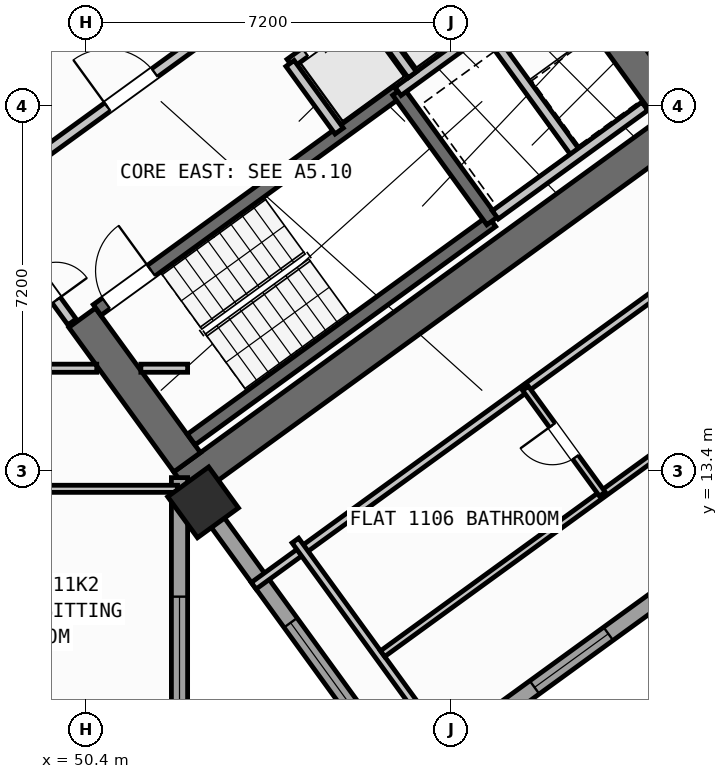
"""IFC4 building model, lengths in metres.
Left out: names, types, materials, properties, quantities, classifications, styles, units other than length and angle.
Written with IfcOpenShell. Run it as: python <this file> out.ifc"""

import sys

from ifc_helpers import new_model, si_unit, direction, frame, frame_2d, origin, origin_2d, place, context, subcontext, project, spatial, rectangle, hollow_rectangle, extrude, source, transform, mapped, element, fill, save


model = new_model("IFC4")
c1 = context("Model", 3, precision=1e-05, world=origin(), true_north=direction((0.0, 1.0)))
c2 = subcontext(c1, "Body", "Model", "MODEL_VIEW")
j1 = project(units=[si_unit("LENGTHUNIT", "METRE"), si_unit("PLANEANGLEUNIT", "RADIAN")], contexts=[c1])
p1 = place(None, origin())
s1 = spatial("IfcSite", under=j1, at=p1, CompositionType="ELEMENT")
p2 = place(p1, origin())
s2 = spatial("IfcBuilding", under=s1, at=p2, CompositionType="ELEMENT")
p3 = place(p2, frame((0.0, 0.0, 45.6)))
s3 = spatial("IfcBuildingStorey", under=s2, at=p3, CompositionType="ELEMENT", Elevation=45.6)
p4 = place(p3, frame((52.318, 13.11, 0.0), z_axis=(0.0, 0.0, 1.0), x_axis=(0.809019445368, 0.587781878776, 0.0)))
e1 = element("IfcWall", 1, at=p4, inside=s3, PredefinedType="SHEAR", context=c2, shape_type="SweptSolid", body=[
    extrude(rectangle(XDim=12.44, YDim=0.65, at=frame_2d((6.22, 0.0))), origin(), (0.0, 0.0, 1.0), 3.35),
])
p5 = place(p3, frame((52.39, 13.564, 0.0), z_axis=(0.0, 0.0, 1.0), x_axis=(-0.58779688989, 0.809008539037, 0.0)))
e2 = element("IfcWall", 2, at=p5, inside=s3, PredefinedType="SHEAR", context=c2, shape_type="SweptSolid", body=[
    extrude(rectangle(XDim=3.525, YDim=0.65, at=frame_2d((1.763, 0.0))), origin(), (0.0, 0.0, 1.0), 3.35),
])
p6 = place(p3, frame((61.929, 20.494, 0.0), z_axis=(0.0, 0.0, 1.0), x_axis=(-0.58782982593, 0.808984607855, 0.0)))
e3 = element("IfcWall", 3, at=p6, inside=s3, PredefinedType="SHEAR", context=c2, shape_type="SweptSolid", body=[
    extrude(rectangle(XDim=3.525, YDim=0.65, at=frame_2d((1.762, 0.0))), origin(), (0.0, 0.0, 1.0), 3.35),
])
m1 = source(origin(), c2, "Body", "SweptSolid", [
    extrude(hollow_rectangle(XDim=1.0, YDim=1.0, WallThickness=0.04, at=origin_2d()), origin(), (0.0, 0.0, 1.0), 3.6),
])
p7 = place(p3, frame((52.705, 12.773, 0.0), z_axis=(0.0, 0.0, 1.0), x_axis=(0.809016994375, 0.587785252292, 0.0)))
e4 = element("IfcColumn", 4, at=p7, inside=s3, PredefinedType="COLUMN", context=c2, shape_type="MappedRepresentation", body=[
    mapped(m1, transform((0.0, 0.0, 0.0), scale=1.0)),
])
p8 = place(p3, frame((58.455, 35.484, 0.0), z_axis=(0.0, 0.0, 1.0), x_axis=(0.587783625747, -0.809018176127, 0.0)))
e5 = element("IfcWall", 5, at=p8, inside=s3, PredefinedType="STANDARD", context=c2, shape_type="SweptSolid", body=[
    extrude(rectangle(XDim=21.587, YDim=0.32, at=frame_2d((10.794, 0.0))), origin(), (0.0, 0.0, 1.0), 2.725),
])
p9 = place(p8, frame((1.5, 0.0, 0.8)))
e6 = element("IfcOpeningElement", 6, at=p9, cuts=e5, PredefinedType="OPENING", context=c2, shape_type="SweptSolid", body=[
    extrude(rectangle(XDim=2.1, YDim=1.55, at=frame_2d((1.05, 0.775))), frame((0.0, 0.17, 0.0), z_axis=(0.0, -1.0, 0.0), x_axis=(1.0, 0.0, 0.0)), (0.0, 0.0, 1.0), 0.34),
])
p10 = place(p8, frame((5.105, 0.0, 0.85)))
e7 = element("IfcOpeningElement", 7, at=p10, cuts=e5, PredefinedType="OPENING", context=c2, shape_type="SweptSolid", body=[
    extrude(rectangle(XDim=1.5, YDim=1.5, at=frame_2d((0.75, 0.75))), frame((0.0, 0.17, 0.0), z_axis=(0.0, -1.0, 0.0), x_axis=(1.0, 0.0, 0.0)), (0.0, 0.0, 1.0), 0.34),
])
p11 = place(p8, frame((8.954, 0.0, 0.85)))
e8 = element("IfcOpeningElement", 8, at=p11, cuts=e5, PredefinedType="OPENING", context=c2, shape_type="SweptSolid", body=[
    extrude(rectangle(XDim=1.5, YDim=1.5, at=frame_2d((0.75, 0.75))), frame((0.0, 0.17, 0.0), z_axis=(0.0, -1.0, 0.0), x_axis=(1.0, 0.0, 0.0)), (0.0, 0.0, 1.0), 0.34),
])
p12 = place(p8, frame((17.581, 0.0, 0.95)))
e9 = element("IfcOpeningElement", 9, at=p12, cuts=e5, PredefinedType="OPENING", context=c2, shape_type="SweptSolid", body=[
    extrude(rectangle(XDim=1.2, YDim=1.4, at=frame_2d((0.6, 0.7))), frame((0.0, 0.17, 0.0), z_axis=(0.0, -1.0, 0.0), x_axis=(1.0, 0.0, 0.0)), (0.0, 0.0, 1.0), 0.34),
])
p13 = place(p3, frame((71.098, 17.731, 0.0), z_axis=(0.0, 0.0, 1.0), x_axis=(-0.809021120468, -0.587779573171, 0.0)))
e10 = element("IfcWall", 10, at=p13, inside=s3, PredefinedType="STANDARD", context=c2, shape_type="SweptSolid", body=[
    extrude(rectangle(XDim=17.588, YDim=0.32, at=frame_2d((8.794, 0.0))), origin(), (0.0, 0.0, 1.0), 3.35),
])
p14 = place(p13, frame((1.624, 0.0, 0.0)))
e11 = element("IfcOpeningElement", 11, at=p14, cuts=e10, PredefinedType="OPENING", context=c2, shape_type="SweptSolid", body=[
    extrude(rectangle(XDim=1.05, YDim=2.15, at=frame_2d((0.525, 1.075))), frame((0.0, 0.17, 0.0), z_axis=(0.0, -1.0, 0.0), x_axis=(1.0, 0.0, 0.0)), (0.0, 0.0, 1.0), 0.34),
])
p15 = place(p13, frame((4.104, 0.0, 1.0)))
e12 = element("IfcOpeningElement", 12, at=p15, cuts=e10, PredefinedType="OPENING", context=c2, shape_type="SweptSolid", body=[
    extrude(rectangle(XDim=0.9, YDim=1.25, at=frame_2d((0.45, 0.625))), frame((0.0, 0.17, 0.0), z_axis=(0.0, -1.0, 0.0), x_axis=(1.0, 0.0, 0.0)), (0.0, 0.0, 1.0), 0.34),
])
p16 = place(p13, frame((7.879, 0.0, 0.85)))
e13 = element("IfcOpeningElement", 13, at=p16, cuts=e10, PredefinedType="OPENING", context=c2, shape_type="SweptSolid", body=[
    extrude(rectangle(XDim=1.8, YDim=1.5, at=frame_2d((0.9, 0.75))), frame((0.0, 0.17, 0.0), z_axis=(0.0, -1.0, 0.0), x_axis=(1.0, 0.0, 0.0)), (0.0, 0.0, 1.0), 0.34),
])
p17 = place(p13, frame((12.849, 0.0, 0.85)))
e14 = element("IfcOpeningElement", 14, at=p17, cuts=e10, PredefinedType="OPENING", context=c2, shape_type="SweptSolid", body=[
    extrude(rectangle(XDim=1.8, YDim=1.5, at=frame_2d((0.9, 0.75))), frame((0.0, 0.17, 0.0), z_axis=(0.0, -1.0, 0.0), x_axis=(1.0, 0.0, 0.0)), (0.0, 0.0, 1.0), 0.34),
])
p18 = place(p3, frame((56.581, 7.439, 0.0), z_axis=(0.0, 0.0, 1.0), x_axis=(-0.587785875463, 0.809016541614, 0.0)))
e15 = element("IfcWall", 15, at=p18, inside=s3, PredefinedType="STANDARD", context=c2, shape_type="SweptSolid", body=[
    extrude(rectangle(XDim=6.774, YDim=0.32, at=frame_2d((3.387, 0.0))), origin(), (0.0, 0.0, 1.0), 2.725),
])
p19 = place(p18, frame((1.556, 0.0, 0.8)))
e16 = element("IfcOpeningElement", 16, at=p19, cuts=e15, PredefinedType="OPENING", context=c2, shape_type="SweptSolid", body=[
    extrude(rectangle(XDim=2.1, YDim=1.55, at=frame_2d((1.05, 0.775))), frame((0.0, 0.17, 0.0), z_axis=(0.0, -1.0, 0.0), x_axis=(1.0, 0.0, 0.0)), (0.0, 0.0, 1.0), 0.34),
])
p20 = place(p3, frame((52.24, 13.261, 0.0), z_axis=(0.0, 0.0, 1.0), x_axis=(0.0, -1.0, 0.0)))
e17 = element("IfcWall", 17, at=p20, inside=s3, PredefinedType="STANDARD", context=c2, shape_type="SweptSolid", body=[
    extrude(rectangle(XDim=9.795, YDim=0.32, at=frame_2d((4.897, 0.0))), origin(), (0.0, 0.0, 1.0), 3.35),
])
p21 = place(p20, frame((2.349, 0.0, 0.8)))
e18 = element("IfcOpeningElement", 18, at=p21, cuts=e17, PredefinedType="OPENING", context=c2, shape_type="SweptSolid", body=[
    extrude(rectangle(XDim=2.1, YDim=1.55, at=frame_2d((1.05, 0.775))), frame((0.0, 0.17, 0.0), z_axis=(0.0, -1.0, 0.0), x_axis=(1.0, 0.0, 0.0)), (0.0, 0.0, 1.0), 0.34),
])
p22 = place(p20, frame((7.03, 0.0, 0.85)))
e19 = element("IfcOpeningElement", 19, at=p22, cuts=e17, PredefinedType="OPENING", context=c2, shape_type="SweptSolid", body=[
    extrude(rectangle(XDim=1.8, YDim=1.5, at=frame_2d((0.9, 0.75))), frame((0.0, 0.17, 0.0), z_axis=(0.0, -1.0, 0.0), x_axis=(1.0, 0.0, 0.0)), (0.0, 0.0, 1.0), 0.34),
])
p23 = place(p3, frame((52.472, 14.013, 0.0), z_axis=(0.0, 0.0, 1.0), x_axis=(0.809028366311, 0.587769599847, 0.0)))
e20 = element("IfcWall", 20, at=p23, inside=s3, PredefinedType="SHEAR", context=c2, shape_type="SweptSolid", body=[
    extrude(rectangle(XDim=7.33, YDim=0.26, at=frame_2d((3.665, 0.0))), origin(), (0.0, 0.0, 1.0), 3.35),
])
p24 = place(p3, frame((50.615, 16.57, 0.0), z_axis=(0.0, 0.0, 1.0), x_axis=(0.809028366311, 0.587769599847, 0.0)))
e21 = element("IfcWall", 21, at=p24, inside=s3, PredefinedType="SHEAR", context=c2, shape_type="SweptSolid", body=[
    extrude(rectangle(XDim=7.33, YDim=0.26, at=frame_2d((3.665, 0.0))), origin(), (0.0, 0.0, 1.0), 3.35),
])
p25 = place(p24, frame((0.22, 0.0, 0.0)))
e22 = element("IfcOpeningElement", 22, at=p25, cuts=e21, PredefinedType="OPENING", context=c2, shape_type="SweptSolid", body=[
    extrude(rectangle(XDim=1.1, YDim=2.1, at=frame_2d((0.55, 1.05))), frame((0.0, 0.14, 0.0), z_axis=(0.0, -1.0, 0.0), x_axis=(1.0, 0.0, 0.0)), (0.0, 0.0, 1.0), 0.28),
])
p26 = place(p3, frame((58.41, 18.327, 0.0), z_axis=(0.0, 0.0, 1.0), x_axis=(-0.58776738483, 0.809029975545, 0.0)))
e23 = element("IfcWall", 23, at=p26, inside=s3, PredefinedType="SHEAR", context=c2, shape_type="SweptSolid", body=[
    extrude(rectangle(XDim=3.16, YDim=0.26, at=frame_2d((1.58, 0.0))), origin(), (0.0, 0.0, 1.0), 3.35),
])
p27 = place(p3, frame((47.106, 21.437, 0.0), z_axis=(0.0, 0.0, 1.0), x_axis=(0.809012514015, 0.58779141893, 0.0)))
e24 = element("IfcWall", 24, at=p27, inside=s3, PredefinedType="STANDARD", context=c2, shape_type="SweptSolid", body=[
    extrude(rectangle(XDim=3.398, YDim=0.2, at=frame_2d((1.699, 0.0))), origin(), (0.0, 0.0, 1.0), 3.34),
])
p28 = place(p27, frame((0.408, 0.0, 0.0)))
e25 = element("IfcOpeningElement", 25, at=p28, cuts=e24, PredefinedType="OPENING", context=c2, shape_type="SweptSolid", body=[
    extrude(rectangle(XDim=1.3, YDim=2.2, at=frame_2d((0.65, 1.1))), frame((0.0, 0.11, 0.0), z_axis=(0.0, -1.0, 0.0), x_axis=(1.0, 0.0, 0.0)), (0.0, 0.0, 1.0), 0.22),
])
p29 = place(p3, frame((48.799, 19.107, 0.0), z_axis=(0.0, 0.0, 1.0), x_axis=(0.809012959416, 0.587790805897, 0.0)))
e26 = element("IfcWall", 26, at=p29, inside=s3, PredefinedType="STANDARD", context=c2, shape_type="SweptSolid", body=[
    extrude(rectangle(XDim=5.718, YDim=0.2, at=frame_2d((2.859, 0.0))), origin(), (0.0, 0.0, 1.0), 3.34),
])
p30 = place(p29, frame((2.498, 0.0, 0.0)))
e27 = element("IfcOpeningElement", 27, at=p30, cuts=e26, PredefinedType="OPENING", context=c2, shape_type="SweptSolid", body=[
    extrude(rectangle(XDim=1.15, YDim=2.1, at=frame_2d((0.575, 1.05))), frame((0.0, 0.11, 0.0), z_axis=(0.0, -1.0, 0.0), x_axis=(1.0, 0.0, 0.0)), (0.0, 0.0, 1.0), 0.22),
])
p31 = place(p3, frame((56.553, 20.884, 0.0), z_axis=(0.0, 0.0, 1.0), x_axis=(0.809035789462, 0.587759382205, 0.0)))
e28 = element("IfcWall", 28, at=p31, inside=s3, PredefinedType="STANDARD", context=c2, shape_type="SweptSolid", body=[
    extrude(rectangle(XDim=3.768, YDim=0.2, at=frame_2d((1.884, 0.0))), origin(), (0.0, 0.0, 1.0), 3.34),
])
p32 = place(p31, frame((2.65, 0.0, 0.0)))
e29 = element("IfcOpeningElement", 29, at=p32, cuts=e28, PredefinedType="OPENING", context=c2, shape_type="SweptSolid", body=[
    extrude(rectangle(XDim=0.86, YDim=2.05, at=frame_2d((0.43, 1.025))), frame((0.0, 0.11, 0.0), z_axis=(0.0, -1.0, 0.0), x_axis=(1.0, 0.0, 0.0)), (0.0, 0.0, 1.0), 0.22),
])
p33 = place(p3, frame((54.421, 21.436, 0.0), z_axis=(0.0, 0.0, 1.0), x_axis=(0.809013710463, 0.587789772183, 0.0)))
e30 = element("IfcWall", 30, at=p33, inside=s3, PredefinedType="STANDARD", context=c2, shape_type="SweptSolid", body=[
    extrude(rectangle(XDim=5.36, YDim=0.2, at=frame_2d((2.68, 0.0))), origin(), (0.0, 0.0, 1.0), 3.34),
])
p34 = place(p33, frame((0.37, 0.0, 0.0)))
e31 = element("IfcOpeningElement", 31, at=p34, cuts=e30, PredefinedType="OPENING", context=c2, shape_type="SweptSolid", body=[
    extrude(rectangle(XDim=1.1, YDim=2.15, at=frame_2d((0.55, 1.075))), frame((0.0, 0.11, 0.0), z_axis=(0.0, -1.0, 0.0), x_axis=(1.0, 0.0, 0.0)), (0.0, 0.0, 1.0), 0.22),
])
p35 = place(p33, frame((2.17, 0.0, 0.0)))
e32 = element("IfcOpeningElement", 32, at=p35, cuts=e30, PredefinedType="OPENING", context=c2, shape_type="SweptSolid", body=[
    extrude(rectangle(XDim=1.1, YDim=2.15, at=frame_2d((0.55, 1.075))), frame((0.0, 0.11, 0.0), z_axis=(0.0, -1.0, 0.0), x_axis=(1.0, 0.0, 0.0)), (0.0, 0.0, 1.0), 0.22),
])
p36 = place(p33, frame((3.97, 0.0, 0.0)))
e33 = element("IfcOpeningElement", 33, at=p36, cuts=e30, PredefinedType="OPENING", context=c2, shape_type="SweptSolid", body=[
    extrude(rectangle(XDim=1.1, YDim=2.15, at=frame_2d((0.55, 1.075))), frame((0.0, 0.11, 0.0), z_axis=(0.0, -1.0, 0.0), x_axis=(1.0, 0.0, 0.0)), (0.0, 0.0, 1.0), 0.22),
])
p37 = place(p3, frame((55.391, 20.102, 0.0), z_axis=(0.0, 0.0, 1.0), x_axis=(-0.58778447739, 0.809017557374, 0.0)))
e34 = element("IfcWall", 34, at=p37, inside=s3, PredefinedType="STANDARD", context=c2, shape_type="SweptSolid", body=[
    extrude(rectangle(XDim=1.65, YDim=0.2, at=frame_2d((0.825, 0.0))), origin(), (0.0, 0.0, 1.0), 3.34),
])
p38 = place(p3, frame((56.834, 21.212, 0.0), z_axis=(0.0, 0.0, 1.0), x_axis=(-0.58776738483, 0.809029975545, 0.0)))
e35 = element("IfcWall", 35, at=p38, inside=s3, PredefinedType="STANDARD", context=c2, shape_type="SweptSolid", body=[
    extrude(rectangle(XDim=1.58, YDim=0.2, at=frame_2d((0.79, 0.0))), origin(), (0.0, 0.0, 1.0), 3.34),
])
p39 = place(p3, frame((60.067, 19.655, 0.0), z_axis=(0.0, 0.0, 1.0), x_axis=(-0.587800520745, 0.809005900975, 0.0)))
e36 = element("IfcWall", 36, at=p39, inside=s3, PredefinedType="STANDARD", context=c2, shape_type="SweptSolid", body=[
    extrude(rectangle(XDim=2.66, YDim=0.2, at=frame_2d((1.33, 0.0))), origin(), (0.0, 0.0, 1.0), 3.34),
])
p40 = place(p3, frame((58.472, 18.447, 0.0), z_axis=(0.0, 0.0, 1.0), x_axis=(0.809022487728, 0.587777691266, 0.0)))
e37 = element("IfcWall", 37, at=p40, inside=s3, PredefinedType="STANDARD", context=c2, shape_type="SweptSolid", body=[
    extrude(rectangle(XDim=3.648, YDim=0.2, at=frame_2d((1.824, 0.0))), origin(), (0.0, 0.0, 1.0), 3.34),
])
p41 = place(p3, frame((35.296, 15.42, 0.0), z_axis=(0.0, 0.0, 1.0), x_axis=(1.0, 0.0, 0.0)))
e38 = element("IfcWall", 38, at=p41, inside=s3, PredefinedType="PARTITIONING", context=c2, shape_type="SweptSolid", body=[
    extrude(rectangle(XDim=15.311, YDim=0.16, at=frame_2d((7.655, 0.0))), origin(), (0.0, 0.0, 1.0), 3.34),
])
p42 = place(p41, frame((0.615, 0.0, 0.0)))
e39 = element("IfcOpeningElement", 39, at=p42, cuts=e38, PredefinedType="OPENING", context=c2, shape_type="SweptSolid", body=[
    extrude(rectangle(XDim=1.0, YDim=2.1, at=frame_2d((0.5, 1.05))), frame((0.0, 0.09, 0.0), z_axis=(0.0, -1.0, 0.0), x_axis=(1.0, 0.0, 0.0)), (0.0, 0.0, 1.0), 0.18),
])
p43 = place(p41, frame((9.035, 0.0, 0.0)))
e40 = element("IfcOpeningElement", 40, at=p43, cuts=e38, PredefinedType="OPENING", context=c2, shape_type="SweptSolid", body=[
    extrude(rectangle(XDim=1.0, YDim=2.1, at=frame_2d((0.5, 1.05))), frame((0.0, 0.09, 0.0), z_axis=(0.0, -1.0, 0.0), x_axis=(1.0, 0.0, 0.0)), (0.0, 0.0, 1.0), 0.18),
])
p44 = place(p3, frame((51.477, 15.42, 0.0), z_axis=(0.0, 0.0, 1.0), x_axis=(1.0, 0.0, 0.0)))
e41 = element("IfcWall", 41, at=p44, inside=s3, PredefinedType="PARTITIONING", context=c2, shape_type="SweptSolid", body=[
    extrude(rectangle(XDim=0.923, YDim=0.16, at=frame_2d((0.461, 0.0))), origin(), (0.0, 0.0, 1.0), 3.34),
])
p45 = place(p3, frame((50.119, 16.333, 0.0), z_axis=(0.0, 0.0, 1.0), x_axis=(-0.587749856981, 0.809042709391, 0.0)))
e42 = element("IfcWall", 42, at=p45, inside=s3, PredefinedType="STANDARD", context=c2, shape_type="SweptSolid", body=[
    extrude(rectangle(XDim=2.96, YDim=0.2, at=frame_2d((1.48, 0.0))), origin(), (0.0, 0.0, 1.0), 3.34),
])
p46 = place(p45, frame((0.53, 0.0, 0.0)))
e43 = element("IfcOpeningElement", 43, at=p46, cuts=e42, PredefinedType="OPENING", context=c2, shape_type="SweptSolid", body=[
    extrude(rectangle(XDim=1.5, YDim=2.15, at=frame_2d((0.75, 1.075))), frame((0.0, 0.11, 0.0), z_axis=(0.0, -1.0, 0.0), x_axis=(1.0, 0.0, 0.0)), (0.0, 0.0, 1.0), 0.22),
])
p47 = place(p3, frame((47.663, 13.04, 0.0), z_axis=(0.0, 0.0, 1.0), x_axis=(1.0, 0.0, 0.0)))
e44 = element("IfcWall", 44, at=p47, inside=s3, PredefinedType="PLUMBINGWALL", context=c2, shape_type="SweptSolid", body=[
    extrude(rectangle(XDim=4.538, YDim=0.14, at=frame_2d((2.269, 0.0))), origin(), (0.0, 0.0, 1.0), 2.525),
])
p48 = place(p3, frame((53.705, 11.126, 0.0), z_axis=(0.0, 0.0, 1.0), x_axis=(0.809014504436, 0.587788679384, 0.0)))
e45 = element("IfcWall", 45, at=p48, inside=s3, PredefinedType="PARTITIONING", context=c2, shape_type="SweptSolid", body=[
    extrude(rectangle(XDim=14.67, YDim=0.16, at=frame_2d((7.335, 0.0))), origin(), (0.0, 0.0, 1.0), 3.34),
])
p49 = place(p48, frame((10.2, 0.0, 0.0)))
e46 = element("IfcOpeningElement", 46, at=p49, cuts=e45, PredefinedType="OPENING", context=c2, shape_type="SweptSolid", body=[
    extrude(rectangle(XDim=1.0, YDim=2.1, at=frame_2d((0.5, 1.05))), frame((0.0, 0.09, 0.0), z_axis=(0.0, -1.0, 0.0), x_axis=(1.0, 0.0, 0.0)), (0.0, 0.0, 1.0), 0.18),
])
p50 = place(p3, frame((57.747, 7.586, 0.0), z_axis=(0.0, 0.0, 1.0), x_axis=(-0.587784893399, 0.809017255126, 0.0)))
e47 = element("IfcWall", 47, at=p50, inside=s3, PredefinedType="PARTITIONING", context=c2, shape_type="SweptSolid", body=[
    extrude(rectangle(XDim=5.48, YDim=0.16, at=frame_2d((2.74, 0.0))), origin(), (0.0, 0.0, 1.0), 3.34),
])
p51 = place(p3, frame((56.249, 9.785, 0.0), z_axis=(0.0, 0.0, 1.0), x_axis=(0.809011747655, 0.587792473715, 0.0)))
e48 = element("IfcWall", 48, at=p51, inside=s3, PredefinedType="PLUMBINGWALL", context=c2, shape_type="SweptSolid", body=[
    extrude(rectangle(XDim=13.4, YDim=0.14, at=frame_2d((6.7, 0.0))), origin(), (0.0, 0.0, 1.0), 3.34),
])
p52 = place(p51, frame((8.94, 0.0, 0.0)))
e49 = element("IfcOpeningElement", 49, at=p52, cuts=e48, PredefinedType="OPENING", context=c2, shape_type="SweptSolid", body=[
    extrude(rectangle(XDim=0.92, YDim=2.08, at=frame_2d((0.46, 1.04))), frame((0.0, 0.08, 0.0), z_axis=(0.0, -1.0, 0.0), x_axis=(1.0, 0.0, 0.0)), (0.0, 0.0, 1.0), 0.16),
])
p53 = place(p3, frame((60.585, 12.936, 0.0), z_axis=(0.0, 0.0, 1.0), x_axis=(-0.587772116736, 0.809026537752, 0.0)))
e50 = element("IfcWall", 50, at=p53, inside=s3, PredefinedType="PLUMBINGWALL", context=c2, shape_type="SweptSolid", body=[
    extrude(rectangle(XDim=2.58, YDim=0.14, at=frame_2d((1.29, 0.0))), origin(), (0.0, 0.0, 1.0), 3.34),
])
p54 = place(p53, frame((0.9, 0.0, 0.0)))
e51 = element("IfcOpeningElement", 51, at=p54, cuts=e50, PredefinedType="OPENING", context=c2, shape_type="SweptSolid", body=[
    extrude(rectangle(XDim=0.78, YDim=2.05, at=frame_2d((0.39, 1.025))), frame((0.0, 0.08, 0.0), z_axis=(0.0, -1.0, 0.0), x_axis=(1.0, 0.0, 0.0)), (0.0, 0.0, 1.0), 0.16),
])
m2 = source(origin(), c2, "Body", "SweptSolid", [
    extrude(rectangle(XDim=1.8, YDim=1.5, at=frame_2d((0.9, 0.75))), frame((0.0, 0.03, 0.0), z_axis=(0.0, -1.0, 0.0), x_axis=(1.0, 0.0, 0.0)), (0.0, 0.0, 1.0), 0.06),
])
p55 = place(p17, origin())
e52 = element("IfcWindow", 52, at=p55, inside=s3, PartitioningType="SINGLE_PANEL", PredefinedType="WINDOW", context=c2, shape_type="MappedRepresentation", body=[
    mapped(m2, transform((0.0, 0.0, 0.0), scale=1.0)),
])
fill(e14, e52)
m3 = source(origin(), c2, "Body", "SweptSolid", [
    extrude(rectangle(XDim=2.1, YDim=1.55, at=frame_2d((1.05, 0.775))), frame((0.0, 0.03, 0.0), z_axis=(0.0, -1.0, 0.0), x_axis=(1.0, 0.0, 0.0)), (0.0, 0.0, 1.0), 0.06),
])
p56 = place(p19, origin())
e53 = element("IfcWindow", 53, at=p56, inside=s3, PartitioningType="SINGLE_PANEL", PredefinedType="WINDOW", context=c2, shape_type="MappedRepresentation", body=[
    mapped(m3, transform((0.0, 0.0, 0.0), scale=1.0)),
])
fill(e16, e53)
p57 = place(p21, origin())
e54 = element("IfcWindow", 54, at=p57, inside=s3, PartitioningType="SINGLE_PANEL", PredefinedType="WINDOW", context=c2, shape_type="MappedRepresentation", body=[
    mapped(m3, transform((0.0, 0.0, 0.0), scale=1.0)),
])
fill(e18, e54)
m4 = source(origin(), c2, "Body", "SweptSolid", [
    extrude(rectangle(XDim=1.1, YDim=2.1, at=frame_2d((0.55, 1.05))), frame((0.0, 0.025, 0.0), z_axis=(0.0, -1.0, 0.0), x_axis=(1.0, 0.0, 0.0)), (0.0, 0.0, 1.0), 0.05),
])
p58 = place(p25, origin())
e55 = element("IfcDoor", 55, at=p58, inside=s3, OperationType="SINGLE_SWING_RIGHT", PredefinedType="DOOR", context=c2, shape_type="MappedRepresentation", body=[
    mapped(m4, transform((0.0, 0.0, 0.0), scale=1.0)),
])
fill(e22, e55)
m5 = source(origin(), c2, "Body", "SweptSolid", [
    extrude(rectangle(XDim=1.15, YDim=2.1, at=frame_2d((0.575, 1.05))), frame((0.0, 0.025, 0.0), z_axis=(0.0, -1.0, 0.0), x_axis=(1.0, 0.0, 0.0)), (0.0, 0.0, 1.0), 0.05),
])
p59 = place(p30, origin())
e56 = element("IfcDoor", 56, at=p59, inside=s3, OperationType="SINGLE_SWING_LEFT", PredefinedType="DOOR", context=c2, shape_type="MappedRepresentation", body=[
    mapped(m5, transform((0.0, 0.0, 0.0), scale=1.0)),
])
fill(e27, e56)
m6 = source(origin(), c2, "Body", "SweptSolid", [
    extrude(rectangle(XDim=1.1, YDim=2.15, at=frame_2d((0.55, 1.075))), frame((0.0, 0.025, 0.0), z_axis=(0.0, -1.0, 0.0), x_axis=(1.0, 0.0, 0.0)), (0.0, 0.0, 1.0), 0.05),
])
p60 = place(p34, origin())
e57 = element("IfcDoor", 57, at=p60, inside=s3, OperationType="DOUBLE_DOOR_SLIDING", PredefinedType="DOOR", context=c2, shape_type="MappedRepresentation", body=[
    mapped(m6, transform((0.0, 0.0, 0.0), scale=1.0)),
])
fill(e31, e57)
m7 = source(origin(), c2, "Body", "SweptSolid", [
    extrude(rectangle(XDim=1.5, YDim=2.15, at=frame_2d((0.75, 1.075))), frame((0.0, 0.025, 0.0), z_axis=(0.0, -1.0, 0.0), x_axis=(1.0, 0.0, 0.0)), (0.0, 0.0, 1.0), 0.05),
])
p61 = place(p46, frame((1.5, 0.0, 0.0), z_axis=(0.0, 0.0, 1.0), x_axis=(-1.0, 0.0, 0.0)))
e58 = element("IfcDoor", 58, at=p61, inside=s3, OperationType="DOUBLE_DOOR_SINGLE_SWING", PredefinedType="DOOR", context=c2, shape_type="MappedRepresentation", body=[
    mapped(m7, transform((0.0, 0.0, 0.0), scale=1.0)),
])
fill(e43, e58)
m8 = source(origin(), c2, "Body", "SweptSolid", [
    extrude(rectangle(XDim=0.78, YDim=2.05, at=frame_2d((0.39, 1.025))), frame((0.0, 0.025, 0.0), z_axis=(0.0, -1.0, 0.0), x_axis=(1.0, 0.0, 0.0)), (0.0, 0.0, 1.0), 0.05),
])
p62 = place(p54, origin())
e59 = element("IfcDoor", 59, at=p62, inside=s3, OperationType="SINGLE_SWING_RIGHT", PredefinedType="DOOR", context=c2, shape_type="MappedRepresentation", body=[
    mapped(m8, transform((0.0, 0.0, 0.0), scale=1.0)),
])
fill(e51, e59)
save(model, sys.argv[1])
